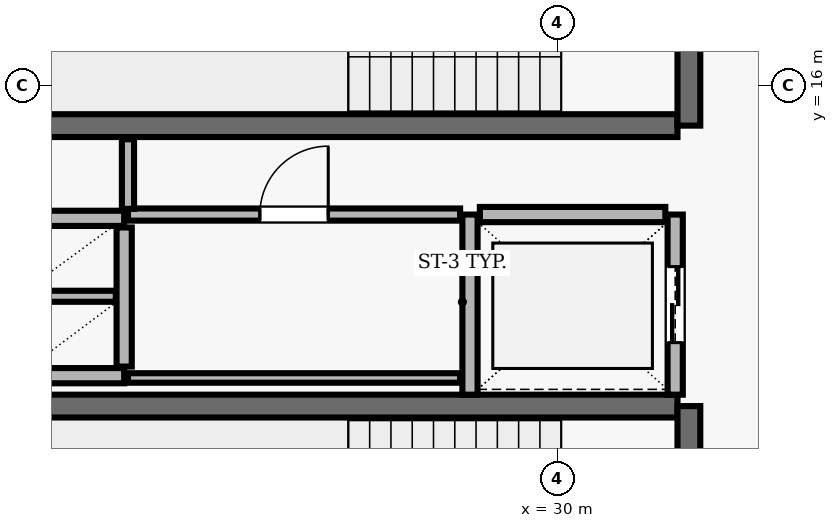
"""IFC4 building model, lengths in metres.
Left out: names, types, materials, properties, quantities, classifications, styles, units other than length and angle.
Written with IfcOpenShell. Run it as: python <this file> out.ifc"""

import sys

from ifc_helpers import new_model, si_unit, direction, frame, frame_2d, origin, place, context, subcontext, project, spatial, rectangle, extrude, element, fill, save


model = new_model("IFC4")
c1 = context("Model", 3, precision=1e-05, world=origin(), true_north=direction((0.0, 1.0)))
c2 = subcontext(c1, "Body", "Model", "MODEL_VIEW")
j1 = project(units=[si_unit("LENGTHUNIT", "METRE"), si_unit("PLANEANGLEUNIT", "RADIAN")], contexts=[c1])
p1 = place(None, origin())
s1 = spatial("IfcSite", under=j1, at=p1, CompositionType="ELEMENT")
p2 = place(p1, origin())
s2 = spatial("IfcBuilding", under=s1, at=p2, CompositionType="ELEMENT")
p3 = place(p2, frame((0.0, 0.0, 175.8)))
s3 = spatial("IfcBuildingStorey", under=s2, at=p3, CompositionType="ELEMENT", Elevation=175.8)
p4 = place(p3, frame((23.22, 15.47, 0.0), z_axis=(0.0, 0.0, 1.0), x_axis=(1.0, 0.0, 0.0)))
e1 = element("IfcWall", 1, at=p4, inside=s3, PredefinedType="SHEAR", context=c2, shape_type="SweptSolid", body=[
    extrude(rectangle(XDim=8.36, YDim=0.3, at=frame_2d((4.18, 0.0))), origin(), (0.0, 0.0, 1.0), 3.69),
])
p5 = place(p3, frame((31.73, 15.47, 0.0), z_axis=(0.0, 0.0, 1.0), x_axis=(0.0, 1.0, 0.0)))
e2 = element("IfcWall", 2, at=p5, inside=s3, PredefinedType="SHEAR", context=c2, shape_type="SweptSolid", body=[
    extrude(rectangle(XDim=3.51, YDim=0.3, at=frame_2d((1.755, 0.0))), origin(), (0.0, 0.0, 1.0), 3.69),
])
p6 = place(p5, frame((1.18, 0.0, 0.0)))
e3 = element("IfcOpeningElement", 3, at=p6, cuts=e2, PredefinedType="OPENING", context=c2, shape_type="SweptSolid", body=[
    extrude(rectangle(XDim=1.15, YDim=2.15, at=frame_2d((0.575, 1.075))), frame((0.0, 0.16, 0.0), z_axis=(0.0, -1.0, 0.0), x_axis=(1.0, 0.0, 0.0)), (0.0, 0.0, 1.0), 0.32),
])
p7 = place(p3, frame((31.58, 11.78, 0.0), z_axis=(0.0, 0.0, 1.0), x_axis=(-1.0, 0.0, 0.0)))
e4 = element("IfcWall", 4, at=p7, inside=s3, PredefinedType="SHEAR", context=c2, shape_type="SweptSolid", body=[
    extrude(rectangle(XDim=8.36, YDim=0.3, at=frame_2d((4.18, 0.0))), origin(), (0.0, 0.0, 1.0), 3.69),
])
p8 = place(p3, frame((31.73, 8.27, 0.0), z_axis=(0.0, 0.0, 1.0), x_axis=(0.0, 1.0, 0.0)))
e5 = element("IfcWall", 5, at=p8, inside=s3, PredefinedType="SHEAR", context=c2, shape_type="SweptSolid", body=[
    extrude(rectangle(XDim=3.51, YDim=0.3, at=frame_2d((1.755, 0.0))), origin(), (0.0, 0.0, 1.0), 3.69),
])
p9 = place(p8, frame((1.18, 0.0, 0.0)))
e6 = element("IfcOpeningElement", 6, at=p9, cuts=e5, PredefinedType="OPENING", context=c2, shape_type="SweptSolid", body=[
    extrude(rectangle(XDim=1.15, YDim=2.15, at=frame_2d((0.575, 1.075))), frame((0.0, 0.16, 0.0), z_axis=(0.0, -1.0, 0.0), x_axis=(1.0, 0.0, 0.0)), (0.0, 0.0, 1.0), 0.32),
])
p10 = place(p3, frame((28.85, 14.3, 0.0), z_axis=(0.0, 0.0, 1.0), x_axis=(0.0, -1.0, 0.0)))
e7 = element("IfcWall", 7, at=p10, inside=s3, PredefinedType="SOLIDWALL", context=c2, shape_type="SweptSolid", body=[
    extrude(rectangle(XDim=2.37, YDim=0.2, at=frame_2d((1.185, 0.0))), origin(), (0.0, 0.0, 1.0), 3.69),
])
p11 = place(p3, frame((31.55, 11.93, 0.0), z_axis=(0.0, 0.0, 1.0), x_axis=(0.0, 1.0, 0.0)))
e8 = element("IfcWall", 8, at=p11, inside=s3, PredefinedType="SOLIDWALL", context=c2, shape_type="SweptSolid", body=[
    extrude(rectangle(XDim=2.37, YDim=0.2, at=frame_2d((1.185, 0.0))), origin(), (0.0, 0.0, 1.0), 3.69),
])
p12 = place(p11, frame((0.685, 0.0, 0.0)))
e9 = element("IfcOpeningElement", 9, at=p12, cuts=e8, PredefinedType="OPENING", context=c2, shape_type="SweptSolid", body=[
    extrude(rectangle(XDim=1.0, YDim=2.1, at=frame_2d((0.5, 1.05))), frame((0.0, 0.11, 0.0), z_axis=(0.0, -1.0, 0.0), x_axis=(1.0, 0.0, 0.0)), (0.0, 0.0, 1.0), 0.22),
])
p13 = place(p3, frame((31.42, 14.3, 0.0), z_axis=(0.0, 0.0, 1.0), x_axis=(-1.0, 0.0, 0.0)))
e10 = element("IfcWall", 10, at=p13, inside=s3, PredefinedType="SOLIDWALL", context=c2, shape_type="SweptSolid", body=[
    extrude(rectangle(XDim=2.44, YDim=0.2, at=frame_2d((1.22, 0.0))), origin(), (0.0, 0.0, 1.0), 3.69),
])
for number, where, z_axis, x_axis in (
    (11, (22.9, 14.25, 0.0), (0.0, 0.0, 1.0), (1.0, 0.0, 0.0)),
    (12, (22.9, 12.18, 0.0), (0.0, 0.0, 1.0), (1.0, 0.0, 0.0)),
):
    element("IfcWall", number, at=place(p3, frame(where, z_axis=z_axis, x_axis=x_axis)), inside=s3, PredefinedType="SOLIDWALL", context=c2, shape_type="SweptSolid", body=[
        extrude(rectangle(XDim=1.4, YDim=0.2, at=frame_2d((0.7, 0.0))), origin(), (0.0, 0.0, 1.0), 3.69),
    ])
p14 = place(p3, frame((24.3, 12.3, 0.0), z_axis=(0.0, 0.0, 1.0), x_axis=(0.0, 1.0, 0.0)))
e13 = element("IfcWall", 13, at=p14, inside=s3, PredefinedType="SOLIDWALL", context=c2, shape_type="SweptSolid", body=[
    extrude(rectangle(XDim=1.83, YDim=0.2, at=frame_2d((0.915, 0.0))), origin(), (0.0, 0.0, 1.0), 3.69),
])
p15 = place(p3, frame((23.01, 13.225, 0.0), z_axis=(0.0, 0.0, 1.0), x_axis=(1.0, 0.0, 0.0)))
e14 = element("IfcWall", 14, at=p15, inside=s3, PredefinedType="PARTITIONING", context=c2, shape_type="SweptSolid", body=[
    extrude(rectangle(XDim=1.18, YDim=0.145, at=frame_2d((0.59, 0.0))), origin(), (0.0, 0.0, 1.0), 3.69),
])
p16 = place(p3, frame((24.35, 12.15, 0.0), z_axis=(0.0, 0.0, 1.0), x_axis=(1.0, 0.0, 0.0)))
e15 = element("IfcWall", 15, at=p16, inside=s3, PredefinedType="PARTITIONING", context=c2, shape_type="SweptSolid", body=[
    extrude(rectangle(XDim=4.37, YDim=0.125, at=frame_2d((2.185, 0.0))), origin(), (0.0, 0.0, 1.0), 3.69),
])
p17 = place(p3, frame((24.35, 14.3, 0.0), z_axis=(0.0, 0.0, 1.0), x_axis=(1.0, 0.0, 0.0)))
e16 = element("IfcWall", 16, at=p17, inside=s3, PredefinedType="PARTITIONING", context=c2, shape_type="SweptSolid", body=[
    extrude(rectangle(XDim=4.37, YDim=0.16, at=frame_2d((2.185, 0.0))), origin(), (0.0, 0.0, 1.0), 3.69),
])
p18 = place(p17, frame((1.735, 0.0, 0.0)))
e17 = element("IfcOpeningElement", 17, at=p18, cuts=e16, PredefinedType="OPENING", context=c2, shape_type="SweptSolid", body=[
    extrude(rectangle(XDim=0.9, YDim=2.1, at=frame_2d((0.45, 1.05))), frame((0.0, 0.09, 0.0), z_axis=(0.0, -1.0, 0.0), x_axis=(1.0, 0.0, 0.0)), (0.0, 0.0, 1.0), 0.18),
])
p19 = place(p3, frame((24.35, 15.29, 0.0), z_axis=(0.0, 0.0, 1.0), x_axis=(0.0, -1.0, 0.0)))
e18 = element("IfcWall", 18, at=p19, inside=s3, PredefinedType="PARTITIONING", context=c2, shape_type="SweptSolid", body=[
    extrude(rectangle(XDim=0.915, YDim=0.16, at=frame_2d((0.458, 0.0))), origin(), (0.0, 0.0, 1.0), 3.69),
])
p20 = place(p12, origin())
e19 = element("IfcDoor", 19, at=p20, inside=s3, OperationType="DOUBLE_DOOR_SLIDING", PredefinedType="DOOR", context=c2, shape_type="SweptSolid", body=[
    extrude(rectangle(XDim=1.0, YDim=2.1, at=frame_2d((0.5, 1.05))), frame((0.0, 0.025, 0.0), z_axis=(0.0, -1.0, 0.0), x_axis=(1.0, 0.0, 0.0)), (0.0, 0.0, 1.0), 0.05),
])
fill(e9, e19)
p21 = place(p18, origin())
e20 = element("IfcDoor", 20, at=p21, inside=s3, OperationType="SINGLE_SWING_RIGHT", PredefinedType="DOOR", context=c2, shape_type="SweptSolid", body=[
    extrude(rectangle(XDim=0.9, YDim=2.1, at=frame_2d((0.45, 1.05))), frame((0.0, 0.025, 0.0), z_axis=(0.0, -1.0, 0.0), x_axis=(1.0, 0.0, 0.0)), (0.0, 0.0, 1.0), 0.05),
])
fill(e17, e20)
save(model, sys.argv[1])
